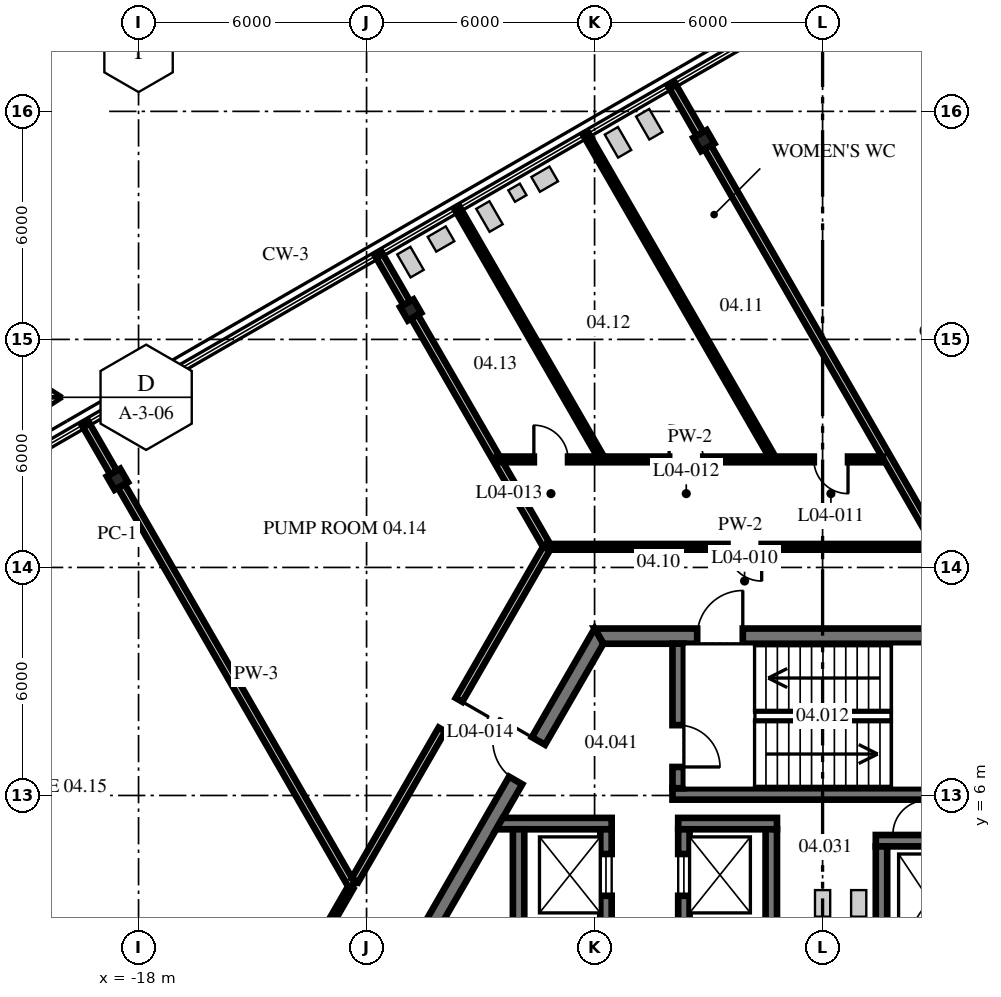
"""IFC4 building model, lengths in metres.
Left out: names, types, materials, properties, quantities, classifications, styles, units other than length and angle.
Written with IfcOpenShell. Run it as: python <this file> out.ifc"""

import sys

from ifc_helpers import new_model, si_unit, direction, frame, frame_2d, origin, origin_2d, place, context, subcontext, project, spatial, polyline, rectangle, i_section, outline, extrude, source, transform, mapped, element, fill, save


model = new_model("IFC4")
c1 = context("Model", 3, precision=1e-05, world=origin(), true_north=direction((0.0, 1.0)))
c2 = subcontext(c1, "Body", "Model", "MODEL_VIEW")
j1 = project(units=[si_unit("LENGTHUNIT", "METRE"), si_unit("PLANEANGLEUNIT", "RADIAN")], contexts=[c1])
p1 = place(None, origin())
s1 = spatial("IfcSite", under=j1, at=p1, CompositionType="ELEMENT")
p2 = place(p1, origin())
s2 = spatial("IfcBuilding", under=s1, at=p2, CompositionType="ELEMENT")
p3 = place(p2, frame((0.0, 0.0, 20.3)))
s3 = spatial("IfcBuildingStorey", under=s2, at=p3, CompositionType="ELEMENT", Elevation=20.3)
m1 = source(origin(), c2, "Body", "SweptSolid", [
    extrude(i_section(OverallWidth=0.404, OverallDepth=0.406, WebThickness=0.027, FlangeThickness=0.044, at=origin_2d()), origin(), (0.0, 0.0, 1.0), 4.3),
])
for number, where, z_axis, x_axis in (
    (1, (-3.124, 23.23, 0.0), (0.0, 0.0, 1.0), (-0.866, -0.5, 0.0)),
    (2, (-10.84, 18.775, 0.0), (0.0, 0.0, 1.0), (-0.866, -0.5, 0.0)),
    (3, (-18.556, 14.32, 0.0), (0.0, 0.0, 1.0), (-0.866, -0.5, 0.0)),
):
    element("IfcColumn", number, at=place(p3, frame(where, z_axis=z_axis, x_axis=x_axis)), inside=s3, PredefinedType="COLUMN", context=c2, shape_type="MappedRepresentation", body=[
        mapped(m1, transform((0.0, 0.0, 0.0), scale=1.0)),
    ])
m2 = source(origin(), c2, "Body", "SweptSolid", [
    extrude(outline(polyline([(-0.115, -0.2), (11.885, -0.2), (11.654, 0.2), (0.115, 0.2), (-0.115, -0.2)])), origin(), (0.0, 0.0, 1.0), 4.1),
])
p4 = place(p3, frame((5.885, 10.192, 0.0), z_axis=(0.0, 0.0, 1.0), x_axis=(-1.0, 0.0, 0.0)))
e4 = element("IfcWall", 4, at=p4, inside=s3, PredefinedType="SHEAR", context=c2, shape_type="MappedRepresentation", body=[
    mapped(m2, transform((0.0, 0.0, 0.0), scale=1.0)),
])
p5 = place(p4, frame((7.985, 0.0, 0.0)))
e5 = element("IfcOpeningElement", 5, at=p5, cuts=e4, PredefinedType="OPENING", context=c2, shape_type="SweptSolid", body=[
    extrude(rectangle(XDim=1.2, YDim=2.1, at=frame_2d((0.6, 1.05))), frame((0.0, 0.21, 0.0), z_axis=(0.0, -1.0, 0.0), x_axis=(1.0, 0.0, 0.0)), (0.0, 0.0, 1.0), 0.42),
])
p6 = place(p3, frame((-5.885, 10.192, 0.0), z_axis=(0.0, 0.0, 1.0), x_axis=(-0.499996592174, -0.866027371285, 0.0)))
e6 = element("IfcWall", 6, at=p6, inside=s3, PredefinedType="SHEAR", context=c2, shape_type="MappedRepresentation", body=[
    mapped(m2, transform((0.0, 0.0, 0.0), scale=1.0)),
])
p7 = place(p6, frame((3.185, 0.0, 0.0)))
e7 = element("IfcOpeningElement", 7, at=p7, cuts=e6, PredefinedType="OPENING", context=c2, shape_type="SweptSolid", body=[
    extrude(rectangle(XDim=1.2, YDim=2.1, at=frame_2d((0.6, 1.05))), frame((0.0, 0.21, 0.0), z_axis=(0.0, -1.0, 0.0), x_axis=(1.0, 0.0, 0.0)), (0.0, 0.0, 1.0), 0.42),
])
m3 = source(origin(), c2, "Body", "SweptSolid", [
    extrude(rectangle(XDim=2.5, YDim=0.3, at=frame_2d((1.25, 0.0))), origin(), (0.0, 0.0, 1.0), 4.1),
])
p8 = place(p3, frame((1.4, 4.81, 0.0), z_axis=(0.0, 0.0, 1.0), x_axis=(1.0, 0.0, 0.0)))
e8 = element("IfcWall", 8, at=p8, inside=s3, PredefinedType="SHEAR", context=c2, shape_type="MappedRepresentation", body=[
    mapped(m3, transform((0.0, 0.0, 0.0), scale=1.0)),
])
m4 = source(origin(), c2, "Body", "SweptSolid", [
    extrude(rectangle(XDim=4.45, YDim=0.3, at=frame_2d((2.225, 0.0))), origin(), (0.0, 0.0, 1.0), 4.1),
])
p9 = place(p3, frame((1.55, 0.21, 0.0), z_axis=(0.0, 0.0, 1.0), x_axis=(0.0, 1.0, 0.0)))
e9 = element("IfcWall", 9, at=p9, inside=s3, PredefinedType="SHEAR", context=c2, shape_type="MappedRepresentation", body=[
    mapped(m4, transform((0.0, 0.0, 0.0), scale=1.0)),
])
m5 = source(origin(), c2, "Body", "SweptSolid", [
    extrude(rectangle(XDim=7.9, YDim=0.3, at=frame_2d((3.95, 0.0))), origin(), (0.0, 0.0, 1.0), 4.1),
])
p10 = place(p3, frame((-3.95, 6.04, 0.0), z_axis=(0.0, 0.0, 1.0), x_axis=(1.0, 0.0, 0.0)))
e10 = element("IfcWall", 10, at=p10, inside=s3, PredefinedType="SHEAR", context=c2, shape_type="MappedRepresentation", body=[
    mapped(m5, transform((0.0, 0.0, 0.0), scale=1.0)),
])
m6 = source(origin(), c2, "Body", "SweptSolid", [
    extrude(outline(polyline([(0.0, -0.15), (0.0, 0.15), (3.804, 0.15), (3.804, -0.15), (0.0, -0.15)])), origin(), (0.0, 0.0, 1.0), 4.1),
])
p11 = place(p3, frame((-3.8, 6.19, 0.0), z_axis=(0.0, 0.0, 1.0), x_axis=(0.0, 1.0, 0.0)))
e11 = element("IfcWall", 11, at=p11, inside=s3, PredefinedType="SHEAR", context=c2, shape_type="MappedRepresentation", body=[
    mapped(m6, transform((0.0, 0.0, 0.0), scale=1.0)),
])
p12 = place(p11, frame((0.56, 0.0, 0.0)))
e12 = element("IfcOpeningElement", 12, at=p12, cuts=e11, PredefinedType="OPENING", context=c2, shape_type="SweptSolid", body=[
    extrude(rectangle(XDim=1.1, YDim=2.1, at=frame_2d((0.55, 1.05))), frame((0.0, 0.16, 0.0), z_axis=(0.0, -1.0, 0.0), x_axis=(1.0, 0.0, 0.0)), (0.0, 0.0, 1.0), 0.32),
])
m7 = source(origin(), c2, "Body", "SweptSolid", [
    extrude(outline(polyline([(2.6, -0.15), (-0.44, -0.15), (-0.267, 0.15), (2.6, 0.15), (2.6, -0.15)])), origin(), (0.0, 0.0, 1.0), 4.1),
])
p13 = place(p3, frame((-8.15, 5.26, 0.0), z_axis=(0.0, 0.0, 1.0), x_axis=(1.0, 0.0, 0.0)))
e13 = element("IfcWall", 13, at=p13, inside=s3, PredefinedType="SHEAR", context=c2, shape_type="MappedRepresentation", body=[
    mapped(m7, transform((0.0, 0.0, 0.0), scale=1.0)),
])
m8 = source(origin(), c2, "Body", "SweptSolid", [
    extrude(rectangle(XDim=2.4, YDim=0.3, at=frame_2d((1.2, 0.0))), origin(), (0.0, 0.0, 1.0), 4.1),
])
p14 = place(p3, frame((-8.0, 2.71, 0.0), z_axis=(0.0, 0.0, 1.0), x_axis=(0.0, 1.0, 0.0)))
e14 = element("IfcWall", 14, at=p14, inside=s3, PredefinedType="SHEAR", context=c2, shape_type="MappedRepresentation", body=[
    mapped(m8, transform((0.0, 0.0, 0.0), scale=1.0)),
])
p15 = place(p3, frame((-5.7, 2.71, 0.0), z_axis=(0.0, 0.0, 1.0), x_axis=(0.0, 1.0, 0.0)))
e15 = element("IfcWall", 15, at=p15, inside=s3, PredefinedType="SHEAR", context=c2, shape_type="MappedRepresentation", body=[
    mapped(m8, transform((0.0, 0.0, 0.0), scale=1.0)),
])
p16 = place(p15, frame((0.65, 0.0, 0.0)))
e16 = element("IfcOpeningElement", 16, at=p16, cuts=e15, PredefinedType="OPENING", context=c2, shape_type="SweptSolid", body=[
    extrude(rectangle(XDim=1.1, YDim=2.1, at=frame_2d((0.55, 1.05))), frame((0.0, 0.16, 0.0), z_axis=(0.0, -1.0, 0.0), x_axis=(1.0, 0.0, 0.0)), (0.0, 0.0, 1.0), 0.32),
])
m9 = source(origin(), c2, "Body", "SweptSolid", [
    extrude(rectangle(XDim=2.6, YDim=0.3, at=frame_2d((1.3, 0.0))), origin(), (0.0, 0.0, 1.0), 4.1),
])
p17 = place(p3, frame((-3.8, 5.26, 0.0), z_axis=(0.0, 0.0, 1.0), x_axis=(1.0, 0.0, 0.0)))
e17 = element("IfcWall", 17, at=p17, inside=s3, PredefinedType="SHEAR", context=c2, shape_type="MappedRepresentation", body=[
    mapped(m9, transform((0.0, 0.0, 0.0), scale=1.0)),
])
p18 = place(p3, frame((-3.65, 2.71, 0.0), z_axis=(0.0, 0.0, 1.0), x_axis=(0.0, 1.0, 0.0)))
e18 = element("IfcWall", 18, at=p18, inside=s3, PredefinedType="SHEAR", context=c2, shape_type="MappedRepresentation", body=[
    mapped(m8, transform((0.0, 0.0, 0.0), scale=1.0)),
])
p19 = place(p18, frame((0.65, 0.0, 0.0)))
e19 = element("IfcOpeningElement", 19, at=p19, cuts=e18, PredefinedType="OPENING", context=c2, shape_type="SweptSolid", body=[
    extrude(rectangle(XDim=1.1, YDim=2.1, at=frame_2d((0.55, 1.05))), frame((0.0, 0.16, 0.0), z_axis=(0.0, -1.0, 0.0), x_axis=(1.0, 0.0, 0.0)), (0.0, 0.0, 1.0), 0.32),
])
p20 = place(p3, frame((-1.35, 2.71, 0.0), z_axis=(0.0, 0.0, 1.0), x_axis=(0.0, 1.0, 0.0)))
e20 = element("IfcWall", 20, at=p20, inside=s3, PredefinedType="SHEAR", context=c2, shape_type="MappedRepresentation", body=[
    mapped(m8, transform((0.0, 0.0, 0.0), scale=1.0)),
])
m10 = source(origin(), c2, "Body", "SweptSolid", [
    extrude(rectangle(XDim=1.499, YDim=0.2, at=frame_2d((0.749, 0.0))), origin(), (0.0, 0.0, 1.0), 4.1),
])
p21 = place(p3, frame((-19.402, 15.785, 0.0), z_axis=(0.0, 0.0, 1.0), x_axis=(0.499976292358, -0.866039090965, 0.0)))
e21 = element("IfcWall", 21, at=p21, inside=s3, PredefinedType="PARTITIONING", context=c2, shape_type="MappedRepresentation", body=[
    mapped(m10, transform((0.0, 0.0, 0.0), scale=1.0)),
])
m11 = source(origin(), c2, "Body", "SweptSolid", [
    extrude(rectangle(XDim=12.148, YDim=0.2, at=frame_2d((6.074, 0.0))), origin(), (0.0, 0.0, 1.0), 3.343),
])
p22 = place(p3, frame((-18.459, 14.153, 0.0), z_axis=(0.0, 0.0, 1.0), x_axis=(0.500006022464, -0.866021926685, 0.0)))
e22 = element("IfcWall", 22, at=p22, inside=s3, PredefinedType="PARTITIONING", context=c2, shape_type="MappedRepresentation", body=[
    mapped(m11, transform((0.0, 0.0, 0.0), scale=1.0)),
])
p23 = place(p3, frame((-11.686, 20.24, 0.0), z_axis=(0.0, 0.0, 1.0), x_axis=(0.499976292358, -0.866039090965, 0.0)))
e23 = element("IfcWall", 23, at=p23, inside=s3, PredefinedType="PARTITIONING", context=c2, shape_type="MappedRepresentation", body=[
    mapped(m10, transform((0.0, 0.0, 0.0), scale=1.0)),
])
m12 = source(origin(), c2, "Body", "SweptSolid", [
    extrude(rectangle(XDim=6.934, YDim=0.2, at=frame_2d((3.467, 0.0))), origin(), (0.0, 0.0, 1.0), 3.488),
])
p24 = place(p3, frame((-10.743, 18.608, 0.0), z_axis=(0.0, 0.0, 1.0), x_axis=(0.499986605379, -0.866033137035, 0.0)))
e24 = element("IfcWall", 24, at=p24, inside=s3, PredefinedType="PARTITIONING", context=c2, shape_type="MappedRepresentation", body=[
    mapped(m12, transform((0.0, 0.0, 0.0), scale=1.0)),
])
m13 = source(origin(), c2, "Body", "SweptSolid", [
    extrude(rectangle(XDim=7.509, YDim=0.15, at=frame_2d((3.754, 0.0))), origin(), (0.0, 0.0, 1.0), 4.1),
])
p25 = place(p3, frame((-9.607, 21.44, 0.0), z_axis=(0.0, 0.0, 1.0), x_axis=(0.500006720231, -0.866021523823, 0.0)))
e25 = element("IfcWall", 25, at=p25, inside=s3, PredefinedType="PARTITIONING", context=c2, shape_type="MappedRepresentation", body=[
    mapped(m13, transform((0.0, 0.0, 0.0), scale=1.0)),
])
m14 = source(origin(), c2, "Body", "SweptSolid", [
    extrude(rectangle(XDim=9.764, YDim=0.15, at=frame_2d((4.882, 0.0))), origin(), (0.0, 0.0, 1.0), 4.1),
])
p26 = place(p3, frame((-6.225, 23.393, 0.0), z_axis=(0.0, 0.0, 1.0), x_axis=(0.499990124937, -0.86603110508, 0.0)))
e26 = element("IfcWall", 26, at=p26, inside=s3, PredefinedType="PARTITIONING", context=c2, shape_type="MappedRepresentation", body=[
    mapped(m14, transform((0.0, 0.0, 0.0), scale=1.0)),
])
m15 = source(origin(), c2, "Body", "SweptSolid", [
    extrude(rectangle(XDim=1.499, YDim=0.2, at=frame_2d((0.75, 0.0))), origin(), (0.0, 0.0, 1.0), 4.1),
])
p27 = place(p3, frame((-3.969, 24.695, 0.0), z_axis=(0.0, 0.0, 1.0), x_axis=(0.499905760005, -0.866079806435, 0.0)))
e27 = element("IfcWall", 27, at=p27, inside=s3, PredefinedType="PARTITIONING", context=c2, shape_type="MappedRepresentation", body=[
    mapped(m15, transform((0.0, 0.0, 0.0), scale=1.0)),
])
m16 = source(origin(), c2, "Body", "SweptSolid", [
    extrude(rectangle(XDim=12.148, YDim=0.2, at=frame_2d((6.074, 0.0))), origin(), (0.0, 0.0, 1.0), 3.343),
])
p28 = place(p3, frame((-3.027, 23.063, 0.0), z_axis=(0.0, 0.0, 1.0), x_axis=(0.499997320042, -0.866026951053, 0.0)))
e28 = element("IfcWall", 28, at=p28, inside=s3, PredefinedType="PARTITIONING", context=c2, shape_type="MappedRepresentation", body=[
    mapped(m16, transform((0.0, 0.0, 0.0), scale=1.0)),
])
m17 = source(origin(), c2, "Body", "SweptSolid", [
    extrude(rectangle(XDim=10.155, YDim=0.15, at=frame_2d((5.077, 0.0))), origin(), (0.0, 0.0, 1.0), 4.1),
])
p29 = place(p3, frame((-7.241, 12.542, 0.0), z_axis=(0.0, 0.0, 1.0), x_axis=(1.0, 0.0, 0.0)))
e29 = element("IfcWall", 29, at=p29, inside=s3, PredefinedType="PARTITIONING", context=c2, shape_type="MappedRepresentation", body=[
    mapped(m17, transform((0.0, 0.0, 0.0), scale=1.0)),
])
p30 = place(p29, frame((4.738, 0.0, 0.0)))
e30 = element("IfcOpeningElement", 30, at=p30, cuts=e29, PredefinedType="OPENING", context=c2, shape_type="SweptSolid", body=[
    extrude(rectangle(XDim=0.9, YDim=2.1, at=frame_2d((0.45, 1.05))), frame((0.0, 0.085, 0.0), z_axis=(0.0, -1.0, 0.0), x_axis=(1.0, 0.0, 0.0)), (0.0, 0.0, 1.0), 0.17),
])
m18 = source(origin(), c2, "Body", "SweptSolid", [
    extrude(rectangle(XDim=10.158, YDim=0.15, at=frame_2d((5.079, 0.0))), origin(), (0.0, 0.0, 1.0), 4.1),
])
p31 = place(p3, frame((-8.569, 14.842, 0.0), z_axis=(0.0, 0.0, 1.0), x_axis=(1.0, 0.0, 0.0)))
e31 = element("IfcWall", 31, at=p31, inside=s3, PredefinedType="PARTITIONING", context=c2, shape_type="MappedRepresentation", body=[
    mapped(m18, transform((0.0, 0.0, 0.0), scale=1.0)),
])
p32 = place(p31, frame((8.338, 0.0, 0.0)))
e32 = element("IfcOpeningElement", 32, at=p32, cuts=e31, PredefinedType="OPENING", context=c2, shape_type="SweptSolid", body=[
    extrude(rectangle(XDim=0.9, YDim=2.1, at=frame_2d((0.45, 1.05))), frame((0.0, 0.085, 0.0), z_axis=(0.0, -1.0, 0.0), x_axis=(1.0, 0.0, 0.0)), (0.0, 0.0, 1.0), 0.17),
])
p33 = place(p31, frame((4.531, 0.0, 0.0)))
e33 = element("IfcOpeningElement", 33, at=p33, cuts=e31, PredefinedType="OPENING", context=c2, shape_type="SweptSolid", body=[
    extrude(rectangle(XDim=0.9, YDim=2.1, at=frame_2d((0.45, 1.05))), frame((0.0, 0.085, 0.0), z_axis=(0.0, -1.0, 0.0), x_axis=(1.0, 0.0, 0.0)), (0.0, 0.0, 1.0), 0.17),
])
p34 = place(p31, frame((0.971, 0.0, 0.0)))
e34 = element("IfcOpeningElement", 34, at=p34, cuts=e31, PredefinedType="OPENING", context=c2, shape_type="SweptSolid", body=[
    extrude(rectangle(XDim=0.9, YDim=2.1, at=frame_2d((0.45, 1.05))), frame((0.0, 0.085, 0.0), z_axis=(0.0, -1.0, 0.0), x_axis=(1.0, 0.0, 0.0)), (0.0, 0.0, 1.0), 0.17),
])
m19 = source(origin(), c2, "Body", "SweptSolid", [
    extrude(rectangle(XDim=4.111, YDim=0.15, at=frame_2d((2.056, 0.0))), origin(), (0.0, 0.0, 1.0), 4.1),
])
p35 = place(p3, frame((-14.473, 0.017, 0.0), z_axis=(0.0, 0.0, 1.0), x_axis=(0.500022314862, 0.866012519909, 0.0)))
e35 = element("IfcWall", 35, at=p35, inside=s3, PredefinedType="PARTITIONING", context=c2, shape_type="MappedRepresentation", body=[
    mapped(m19, transform((0.0, 0.0, 0.0), scale=1.0)),
])
p36 = place(p35, frame((1.625, 0.0, 0.0)))
e36 = element("IfcOpeningElement", 36, at=p36, cuts=e35, PredefinedType="OPENING", context=c2, shape_type="SweptSolid", body=[
    extrude(rectangle(XDim=0.9, YDim=2.1, at=frame_2d((0.45, 1.05))), frame((0.0, 0.085, 0.0), z_axis=(0.0, -1.0, 0.0), x_axis=(1.0, 0.0, 0.0)), (0.0, 0.0, 1.0), 0.17),
])
m20 = source(origin(), c2, "Body", "SweptSolid", [
    extrude(rectangle(XDim=10.082, YDim=0.2, at=frame_2d((5.041, 0.0))), origin(), (0.0, 0.0, 1.0), 4.1),
])
p37 = place(p3, frame((-12.307, 3.768, 0.0), z_axis=(0.0, 0.0, 1.0), x_axis=(0.500014523669, 0.866017018378, 0.0)))
e37 = element("IfcWall", 37, at=p37, inside=s3, PredefinedType="PARTITIONING", context=c2, shape_type="MappedRepresentation", body=[
    mapped(m20, transform((0.0, 0.0, 0.0), scale=1.0)),
])
p38 = place(p37, frame((4.582, 0.0, 0.0)))
e38 = element("IfcOpeningElement", 38, at=p38, cuts=e37, PredefinedType="OPENING", context=c2, shape_type="SweptSolid", body=[
    extrude(rectangle(XDim=0.9, YDim=2.1, at=frame_2d((0.45, 1.05))), frame((0.0, 0.11, 0.0), z_axis=(0.0, -1.0, 0.0), x_axis=(1.0, 0.0, 0.0)), (0.0, 0.0, 1.0), 0.22),
])
p39 = place(p5, frame((1.2, 0.0, 0.0), z_axis=(0.0, 0.0, 1.0), x_axis=(-1.0, 0.0, 0.0)))
e39 = element("IfcDoor", 39, at=p39, inside=s3, OperationType="SINGLE_SWING_RIGHT", PredefinedType="DOOR", context=c2, shape_type="SweptSolid", body=[
    extrude(rectangle(XDim=1.2, YDim=2.1, at=frame_2d((0.6, 1.05))), frame((0.0, 0.025, 0.0), z_axis=(0.0, -1.0, 0.0), x_axis=(1.0, 0.0, 0.0)), (0.0, 0.0, 1.0), 0.05),
])
fill(e5, e39)
p40 = place(p7, frame((1.2, 0.0, 0.0), z_axis=(0.0, 0.0, 1.0), x_axis=(-1.0, 0.0, 0.0)))
e40 = element("IfcDoor", 40, at=p40, inside=s3, OperationType="SINGLE_SWING_RIGHT", PredefinedType="DOOR", context=c2, shape_type="SweptSolid", body=[
    extrude(rectangle(XDim=1.2, YDim=2.1, at=frame_2d((0.6, 1.05))), frame((0.0, 0.025, 0.0), z_axis=(0.0, -1.0, 0.0), x_axis=(1.0, 0.0, 0.0)), (0.0, 0.0, 1.0), 0.05),
])
fill(e7, e40)
p41 = place(p12, frame((1.1, 0.0, 0.0), z_axis=(0.0, 0.0, 1.0), x_axis=(-1.0, 0.0, 0.0)))
e41 = element("IfcDoor", 41, at=p41, inside=s3, OperationType="SINGLE_SWING_RIGHT", PredefinedType="DOOR", context=c2, shape_type="SweptSolid", body=[
    extrude(rectangle(XDim=1.1, YDim=2.1, at=frame_2d((0.55, 1.05))), frame((0.0, 0.025, 0.0), z_axis=(0.0, -1.0, 0.0), x_axis=(1.0, 0.0, 0.0)), (0.0, 0.0, 1.0), 0.05),
])
fill(e12, e41)
p42 = place(p16, origin())
e42 = element("IfcDoor", 42, at=p42, inside=s3, OperationType="DOUBLE_DOOR_SLIDING", PredefinedType="DOOR", context=c2, shape_type="SweptSolid", body=[
    extrude(rectangle(XDim=1.1, YDim=2.1, at=frame_2d((0.55, 1.05))), frame((0.0, 0.025, 0.0), z_axis=(0.0, -1.0, 0.0), x_axis=(1.0, 0.0, 0.0)), (0.0, 0.0, 1.0), 0.05),
])
fill(e16, e42)
p43 = place(p19, origin())
e43 = element("IfcDoor", 43, at=p43, inside=s3, OperationType="DOUBLE_DOOR_SLIDING", PredefinedType="DOOR", context=c2, shape_type="SweptSolid", body=[
    extrude(rectangle(XDim=1.1, YDim=2.1, at=frame_2d((0.55, 1.05))), frame((0.0, 0.025, 0.0), z_axis=(0.0, -1.0, 0.0), x_axis=(1.0, 0.0, 0.0)), (0.0, 0.0, 1.0), 0.05),
])
fill(e19, e43)
p44 = place(p30, origin())
e44 = element("IfcDoor", 44, at=p44, inside=s3, OperationType="SINGLE_SWING_RIGHT", PredefinedType="DOOR", context=c2, shape_type="SweptSolid", body=[
    extrude(rectangle(XDim=0.9, YDim=2.1, at=frame_2d((0.45, 1.05))), frame((0.0, 0.025, 0.0), z_axis=(0.0, -1.0, 0.0), x_axis=(1.0, 0.0, 0.0)), (0.0, 0.0, 1.0), 0.05),
])
fill(e30, e44)
p45 = place(p32, origin())
e45 = element("IfcDoor", 45, at=p45, inside=s3, OperationType="SINGLE_SWING_RIGHT", PredefinedType="DOOR", context=c2, shape_type="SweptSolid", body=[
    extrude(rectangle(XDim=0.9, YDim=2.1, at=frame_2d((0.45, 1.05))), frame((0.0, 0.025, 0.0), z_axis=(0.0, -1.0, 0.0), x_axis=(1.0, 0.0, 0.0)), (0.0, 0.0, 1.0), 0.05),
])
fill(e32, e45)
p46 = place(p33, origin())
e46 = element("IfcDoor", 46, at=p46, inside=s3, OperationType="SINGLE_SWING_LEFT", PredefinedType="DOOR", context=c2, shape_type="SweptSolid", body=[
    extrude(rectangle(XDim=0.9, YDim=2.1, at=frame_2d((0.45, 1.05))), frame((0.0, 0.025, 0.0), z_axis=(0.0, -1.0, 0.0), x_axis=(1.0, 0.0, 0.0)), (0.0, 0.0, 1.0), 0.05),
])
fill(e33, e46)
p47 = place(p34, origin())
e47 = element("IfcDoor", 47, at=p47, inside=s3, OperationType="SINGLE_SWING_LEFT", PredefinedType="DOOR", context=c2, shape_type="SweptSolid", body=[
    extrude(rectangle(XDim=0.9, YDim=2.1, at=frame_2d((0.45, 1.05))), frame((0.0, 0.025, 0.0), z_axis=(0.0, -1.0, 0.0), x_axis=(1.0, 0.0, 0.0)), (0.0, 0.0, 1.0), 0.05),
])
fill(e34, e47)
p48 = place(p38, origin())
e48 = element("IfcDoor", 48, at=p48, inside=s3, OperationType="SINGLE_SWING_RIGHT", PredefinedType="DOOR", context=c2, shape_type="SweptSolid", body=[
    extrude(rectangle(XDim=0.9, YDim=2.1, at=frame_2d((0.45, 1.05))), frame((0.0, 0.025, 0.0), z_axis=(0.0, -1.0, 0.0), x_axis=(1.0, 0.0, 0.0)), (0.0, 0.0, 1.0), 0.05),
])
fill(e38, e48)
save(model, sys.argv[1])
